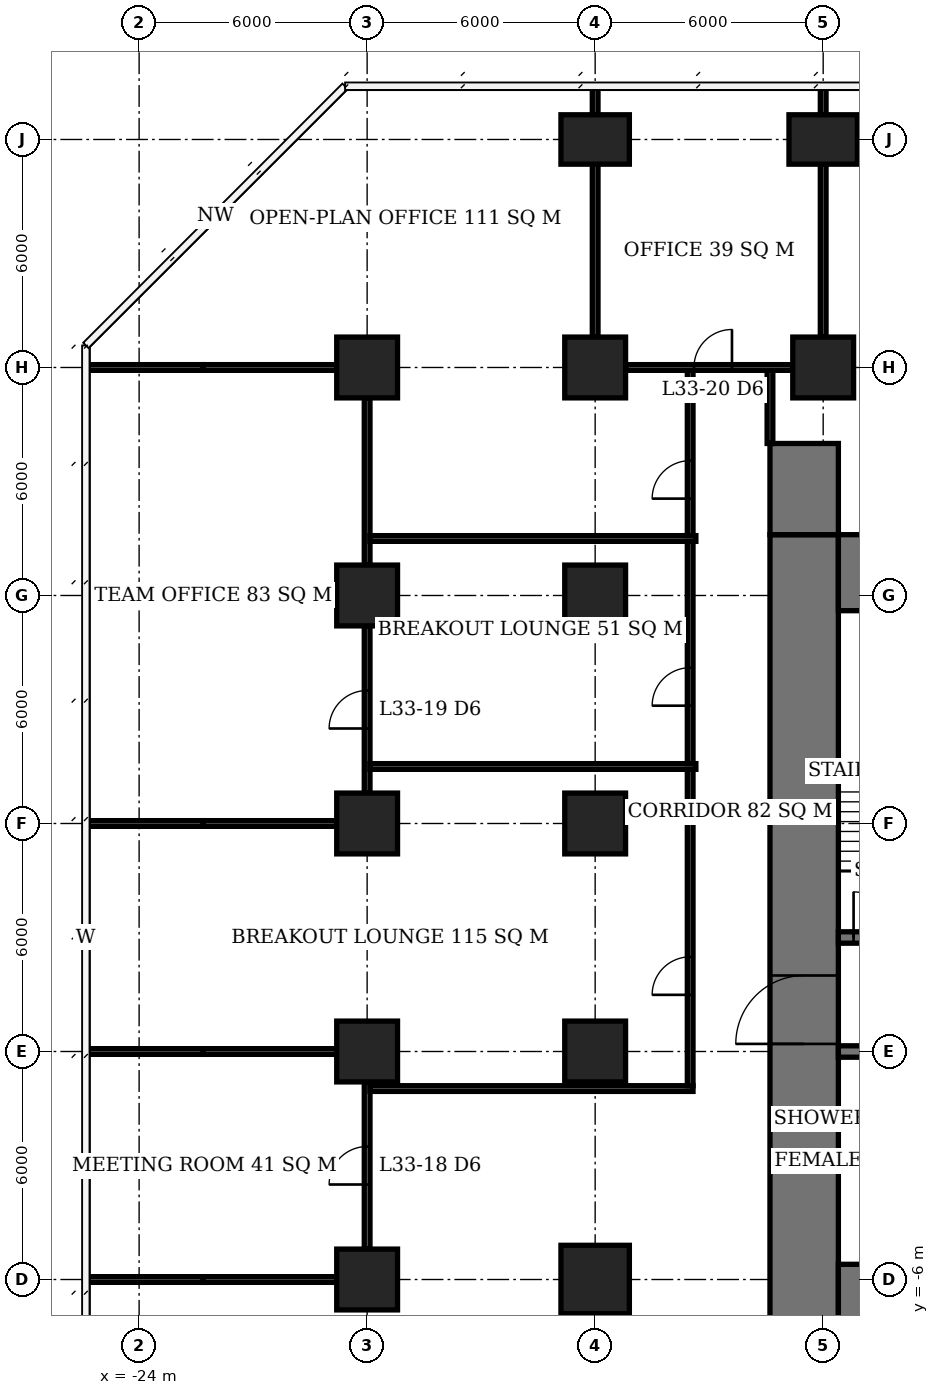
"""IFC4 building model, lengths in metres.
Left out: names, types, materials, properties, quantities, classifications, styles, units other than length and angle.
Written with IfcOpenShell. Run it as: python <this file> out.ifc"""

import sys

from ifc_helpers import new_model, si_unit, direction, frame, frame_2d, origin, origin_2d, place, context, subcontext, project, spatial, rectangle, extrude, element, fill, save


model = new_model("IFC4")
c1 = context("Model", 3, precision=1e-05, world=origin(), true_north=direction((0.0, 1.0)))
c2 = subcontext(c1, "Body", "Model", "MODEL_VIEW")
j1 = project(units=[si_unit("LENGTHUNIT", "METRE"), si_unit("PLANEANGLEUNIT", "RADIAN")], contexts=[c1])
p1 = place(None, origin())
s1 = spatial("IfcSite", under=j1, at=p1, CompositionType="ELEMENT")
p2 = place(p1, origin())
s2 = spatial("IfcBuilding", under=s1, at=p2, CompositionType="ELEMENT")
p3 = place(p2, frame((0.0, 0.0, 136.7)))
s3 = spatial("IfcBuildingStorey", under=s2, at=p3, CompositionType="ELEMENT", Elevation=136.7)
for number, where, z_axis, x_axis in (
    (1, (-18.0, -6.0, 0.0), (0.0, 0.0, 1.0), (1.0, 0.0, 0.0)),
    (2, (-18.0, 0.0, 0.0), (0.0, 0.0, 1.0), (1.0, 0.0, 0.0)),
    (3, (-18.0, 6.0, 0.0), (0.0, 0.0, 1.0), (1.0, 0.0, 0.0)),
    (4, (-18.0, 12.0, 0.0), (0.0, 0.0, 1.0), (1.0, 0.0, 0.0)),
    (5, (-18.0, 18.0, 0.0), (0.0, 0.0, 1.0), (1.0, 0.0, 0.0)),
):
    element("IfcColumn", number, at=place(p3, frame(where, z_axis=z_axis, x_axis=x_axis)), inside=s3, PredefinedType="COLUMN", context=c2, shape_type="SweptSolid", body=[
        extrude(rectangle(XDim=1.6, YDim=1.6, at=origin_2d()), origin(), (0.0, 0.0, 1.0), 3.9),
    ])
p4 = place(p3, frame((-12.0, -6.0, 0.0), z_axis=(0.0, 0.0, 1.0), x_axis=(1.0, 0.0, 0.0)))
e6 = element("IfcColumn", 6, at=p4, inside=s3, PredefinedType="COLUMN", context=c2, shape_type="SweptSolid", body=[
    extrude(rectangle(XDim=1.8, YDim=1.8, at=origin_2d()), origin(), (0.0, 0.0, 1.0), 3.9),
])
for number, where, z_axis, x_axis in (
    (7, (-12.0, 0.0, 0.0), (0.0, 0.0, 1.0), (1.0, 0.0, 0.0)),
    (8, (-12.0, 6.0, 0.0), (0.0, 0.0, 1.0), (1.0, 0.0, 0.0)),
    (9, (-12.0, 12.0, 0.0), (0.0, 0.0, 1.0), (1.0, 0.0, 0.0)),
    (10, (-12.0, 18.0, 0.0), (0.0, 0.0, 1.0), (1.0, 0.0, 0.0)),
):
    element("IfcColumn", number, at=place(p3, frame(where, z_axis=z_axis, x_axis=x_axis)), inside=s3, PredefinedType="COLUMN", context=c2, shape_type="SweptSolid", body=[
        extrude(rectangle(XDim=1.6, YDim=1.6, at=origin_2d()), origin(), (0.0, 0.0, 1.0), 3.9),
    ])
p5 = place(p3, frame((-12.0, 24.0, 0.0), z_axis=(0.0, 0.0, 1.0), x_axis=(1.0, 0.0, 0.0)))
e11 = element("IfcColumn", 11, at=p5, inside=s3, PredefinedType="COLUMN", context=c2, shape_type="SweptSolid", body=[
    extrude(rectangle(XDim=1.8, YDim=1.3, at=origin_2d()), origin(), (0.0, 0.0, 1.0), 3.9),
])
p6 = place(p3, frame((-6.0, 18.0, 0.0), z_axis=(0.0, 0.0, 1.0), x_axis=(1.0, 0.0, 0.0)))
e12 = element("IfcColumn", 12, at=p6, inside=s3, PredefinedType="COLUMN", context=c2, shape_type="SweptSolid", body=[
    extrude(rectangle(XDim=1.6, YDim=1.6, at=origin_2d()), origin(), (0.0, 0.0, 1.0), 3.9),
])
p7 = place(p3, frame((-6.0, 24.0, 0.0), z_axis=(0.0, 0.0, 1.0), x_axis=(1.0, 0.0, 0.0)))
e13 = element("IfcColumn", 13, at=p7, inside=s3, PredefinedType="COLUMN", context=c2, shape_type="SweptSolid", body=[
    extrude(rectangle(XDim=1.8, YDim=1.3, at=origin_2d()), origin(), (0.0, 0.0, 1.0), 3.9),
])
for number, where, z_axis, x_axis in (
    (14, (-5.6, -6.6, 0.0), (0.0, 0.0, 1.0), (1.0, 0.0, 0.0)),
    (15, (-5.6, 12.6, 0.0), (0.0, 0.0, 1.0), (1.0, 0.0, 0.0)),
):
    element("IfcWall", number, at=place(p3, frame(where, z_axis=z_axis, x_axis=x_axis)), inside=s3, PredefinedType="SHEAR", context=c2, shape_type="SweptSolid", body=[
        extrude(rectangle(XDim=23.2, YDim=2.0, at=frame_2d((11.6, 0.0))), origin(), (0.0, 0.0, 1.0), 3.9),
    ])
p8 = place(p3, frame((-6.5, -7.6, 0.0), z_axis=(0.0, 0.0, 1.0), x_axis=(0.0, 1.0, 0.0)))
e16 = element("IfcWall", 16, at=p8, inside=s3, PredefinedType="SHEAR", context=c2, shape_type="SweptSolid", body=[
    extrude(rectangle(XDim=21.2, YDim=1.8, at=frame_2d((10.6, 0.0))), origin(), (0.0, 0.0, 1.0), 3.9),
])
p9 = place(p8, frame((7.8, 0.0, 0.0)))
e17 = element("IfcOpeningElement", 17, at=p9, cuts=e16, PredefinedType="OPENING", context=c2, shape_type="SweptSolid", body=[
    extrude(rectangle(XDim=1.8, YDim=2.4, at=frame_2d((0.9, 1.2))), frame((0.0, 0.91, 0.0), z_axis=(0.0, -1.0, 0.0), x_axis=(1.0, 0.0, 0.0)), (0.0, 0.0, 1.0), 1.82),
])
p10 = place(p3, frame((-6.5, 13.6, 0.0), z_axis=(0.0, 0.0, 1.0), x_axis=(0.0, 1.0, 0.0)))
e18 = element("IfcWall", 18, at=p10, inside=s3, PredefinedType="SHEAR", context=c2, shape_type="SweptSolid", body=[
    extrude(rectangle(XDim=2.4, YDim=1.8, at=frame_2d((1.2, 0.0))), origin(), (0.0, 0.0, 1.0), 3.9),
])
p11 = place(p3, frame((-5.6, 0.0, 0.0), z_axis=(0.0, 0.0, 1.0), x_axis=(1.0, 0.0, 0.0)))
e19 = element("IfcWall", 19, at=p11, inside=s3, PredefinedType="SHEAR", context=c2, shape_type="SweptSolid", body=[
    extrude(rectangle(XDim=17.75, YDim=0.3, at=frame_2d((8.875, 0.0))), origin(), (0.0, 0.0, 1.0), 3.9),
])
p12 = place(p11, frame((0.6, 0.0, 0.0)))
e20 = element("IfcOpeningElement", 20, at=p12, cuts=e19, PredefinedType="OPENING", context=c2, shape_type="SweptSolid", body=[
    extrude(rectangle(XDim=0.9, YDim=2.1, at=frame_2d((0.45, 1.05))), frame((0.0, 0.16, 0.0), z_axis=(0.0, -1.0, 0.0), x_axis=(1.0, 0.0, 0.0)), (0.0, 0.0, 1.0), 0.32),
])
p13 = place(p11, frame((3.7, 0.0, 0.0)))
e21 = element("IfcOpeningElement", 21, at=p13, cuts=e19, PredefinedType="OPENING", context=c2, shape_type="SweptSolid", body=[
    extrude(rectangle(XDim=0.9, YDim=2.1, at=frame_2d((0.45, 1.05))), frame((0.0, 0.16, 0.0), z_axis=(0.0, -1.0, 0.0), x_axis=(1.0, 0.0, 0.0)), (0.0, 0.0, 1.0), 0.32),
])
p14 = place(p11, frame((6.55, 0.0, 0.0)))
e22 = element("IfcOpeningElement", 22, at=p14, cuts=e19, PredefinedType="OPENING", context=c2, shape_type="SweptSolid", body=[
    extrude(rectangle(XDim=1.1, YDim=2.1, at=frame_2d((0.55, 1.05))), frame((0.0, 0.16, 0.0), z_axis=(0.0, -1.0, 0.0), x_axis=(1.0, 0.0, 0.0)), (0.0, 0.0, 1.0), 0.32),
])
p15 = place(p11, frame((9.55, 0.0, 0.0)))
e23 = element("IfcOpeningElement", 23, at=p15, cuts=e19, PredefinedType="OPENING", context=c2, shape_type="SweptSolid", body=[
    extrude(rectangle(XDim=1.1, YDim=2.1, at=frame_2d((0.55, 1.05))), frame((0.0, 0.16, 0.0), z_axis=(0.0, -1.0, 0.0), x_axis=(1.0, 0.0, 0.0)), (0.0, 0.0, 1.0), 0.32),
])
p16 = place(p3, frame((-5.6, 3.0, 0.0), z_axis=(0.0, 0.0, 1.0), x_axis=(1.0, 0.0, 0.0)))
e24 = element("IfcWall", 24, at=p16, inside=s3, PredefinedType="SHEAR", context=c2, shape_type="SweptSolid", body=[
    extrude(rectangle(XDim=5.45, YDim=0.3, at=frame_2d((2.725, 0.0))), origin(), (0.0, 0.0, 1.0), 3.9),
])
p17 = place(p16, frame((0.4, 0.0, 0.0)))
e25 = element("IfcOpeningElement", 25, at=p17, cuts=e24, PredefinedType="OPENING", context=c2, shape_type="SweptSolid", body=[
    extrude(rectangle(XDim=1.2, YDim=2.1, at=frame_2d((0.6, 1.05))), frame((0.0, 0.16, 0.0), z_axis=(0.0, -1.0, 0.0), x_axis=(1.0, 0.0, 0.0)), (0.0, 0.0, 1.0), 0.32),
])
p18 = place(p16, frame((3.95, 0.0, 0.0)))
e26 = element("IfcOpeningElement", 26, at=p18, cuts=e24, PredefinedType="OPENING", context=c2, shape_type="SweptSolid", body=[
    extrude(rectangle(XDim=0.9, YDim=2.1, at=frame_2d((0.45, 1.05))), frame((0.0, 0.16, 0.0), z_axis=(0.0, -1.0, 0.0), x_axis=(1.0, 0.0, 0.0)), (0.0, 0.0, 1.0), 0.32),
])
p19 = place(p3, frame((-25.4, -6.0, 0.0), z_axis=(0.0, 0.0, 1.0), x_axis=(1.0, 0.0, 0.0)))
e27 = element("IfcWall", 27, at=p19, inside=s3, PredefinedType="PARTITIONING", context=c2, shape_type="SweptSolid", body=[
    extrude(rectangle(XDim=3.09, YDim=0.15, at=frame_2d((1.545, 0.0))), origin(), (0.0, 0.0, 1.0), 3.65),
])
p20 = place(p3, frame((-22.31, -6.0, 0.0), z_axis=(0.0, 0.0, 1.0), x_axis=(1.0, 0.0, 0.0)))
e28 = element("IfcWall", 28, at=p20, inside=s3, PredefinedType="PARTITIONING", context=c2, shape_type="SweptSolid", body=[
    extrude(rectangle(XDim=3.51, YDim=0.15, at=frame_2d((1.755, 0.0))), origin(), (0.0, 0.0, 1.0), 2.65),
])
p21 = place(p3, frame((-25.35, 0.0, 0.0), z_axis=(0.0, 0.0, 1.0), x_axis=(1.0, 0.0, 0.0)))
e29 = element("IfcWall", 29, at=p21, inside=s3, PredefinedType="PARTITIONING", context=c2, shape_type="SweptSolid", body=[
    extrude(rectangle(XDim=3.04, YDim=0.15, at=frame_2d((1.52, 0.0))), origin(), (0.0, 0.0, 1.0), 3.65),
])
p22 = place(p3, frame((-22.31, 0.0, 0.0), z_axis=(0.0, 0.0, 1.0), x_axis=(1.0, 0.0, 0.0)))
e30 = element("IfcWall", 30, at=p22, inside=s3, PredefinedType="PARTITIONING", context=c2, shape_type="SweptSolid", body=[
    extrude(rectangle(XDim=3.51, YDim=0.15, at=frame_2d((1.755, 0.0))), origin(), (0.0, 0.0, 1.0), 2.65),
])
p23 = place(p3, frame((-25.35, 6.0, 0.0), z_axis=(0.0, 0.0, 1.0), x_axis=(1.0, 0.0, 0.0)))
e31 = element("IfcWall", 31, at=p23, inside=s3, PredefinedType="PARTITIONING", context=c2, shape_type="SweptSolid", body=[
    extrude(rectangle(XDim=3.04, YDim=0.15, at=frame_2d((1.52, 0.0))), origin(), (0.0, 0.0, 1.0), 3.65),
])
p24 = place(p3, frame((-22.31, 6.0, 0.0), z_axis=(0.0, 0.0, 1.0), x_axis=(1.0, 0.0, 0.0)))
e32 = element("IfcWall", 32, at=p24, inside=s3, PredefinedType="PARTITIONING", context=c2, shape_type="SweptSolid", body=[
    extrude(rectangle(XDim=3.51, YDim=0.15, at=frame_2d((1.755, 0.0))), origin(), (0.0, 0.0, 1.0), 2.65),
])
p25 = place(p3, frame((-25.4, 18.0, 0.0), z_axis=(0.0, 0.0, 1.0), x_axis=(1.0, 0.0, 0.0)))
e33 = element("IfcWall", 33, at=p25, inside=s3, PredefinedType="PARTITIONING", context=c2, shape_type="SweptSolid", body=[
    extrude(rectangle(XDim=3.09, YDim=0.15, at=frame_2d((1.545, 0.0))), origin(), (0.0, 0.0, 1.0), 3.65),
])
p26 = place(p3, frame((-22.31, 18.0, 0.0), z_axis=(0.0, 0.0, 1.0), x_axis=(1.0, 0.0, 0.0)))
e34 = element("IfcWall", 34, at=p26, inside=s3, PredefinedType="PARTITIONING", context=c2, shape_type="SweptSolid", body=[
    extrude(rectangle(XDim=3.51, YDim=0.15, at=frame_2d((1.755, 0.0))), origin(), (0.0, 0.0, 1.0), 2.65),
])
p27 = place(p3, frame((-11.2, 18.0, 0.0), z_axis=(0.0, 0.0, 1.0), x_axis=(1.0, 0.0, 0.0)))
e35 = element("IfcWall", 35, at=p27, inside=s3, PredefinedType="PARTITIONING", context=c2, shape_type="SweptSolid", body=[
    extrude(rectangle(XDim=4.4, YDim=0.15, at=frame_2d((2.2, 0.0))), origin(), (0.0, 0.0, 1.0), 3.65),
])
p28 = place(p27, frame((1.8, 0.0, 0.0)))
e36 = element("IfcOpeningElement", 36, at=p28, cuts=e35, PredefinedType="OPENING", context=c2, shape_type="SweptSolid", body=[
    extrude(rectangle(XDim=1.0, YDim=2.1, at=frame_2d((0.5, 1.05))), frame((0.0, 0.085, 0.0), z_axis=(0.0, -1.0, 0.0), x_axis=(1.0, 0.0, 0.0)), (0.0, 0.0, 1.0), 0.17),
])
p29 = place(p3, frame((-18.0, -5.2, 0.0), z_axis=(0.0, 0.0, 1.0), x_axis=(0.0, 1.0, 0.0)))
e37 = element("IfcWall", 37, at=p29, inside=s3, PredefinedType="PARTITIONING", context=c2, shape_type="SweptSolid", body=[
    extrude(rectangle(XDim=4.4, YDim=0.15, at=frame_2d((2.2, 0.0))), origin(), (0.0, 0.0, 1.0), 3.65),
])
p30 = place(p29, frame((1.7, 0.0, 0.0)))
e38 = element("IfcOpeningElement", 38, at=p30, cuts=e37, PredefinedType="OPENING", context=c2, shape_type="SweptSolid", body=[
    extrude(rectangle(XDim=1.0, YDim=2.1, at=frame_2d((0.5, 1.05))), frame((0.0, 0.085, 0.0), z_axis=(0.0, -1.0, 0.0), x_axis=(1.0, 0.0, 0.0)), (0.0, 0.0, 1.0), 0.17),
])
p31 = place(p3, frame((-18.0, 6.8, 0.0), z_axis=(0.0, 0.0, 1.0), x_axis=(0.0, 1.0, 0.0)))
e39 = element("IfcWall", 39, at=p31, inside=s3, PredefinedType="PARTITIONING", context=c2, shape_type="SweptSolid", body=[
    extrude(rectangle(XDim=4.4, YDim=0.15, at=frame_2d((2.2, 0.0))), origin(), (0.0, 0.0, 1.0), 3.65),
])
p32 = place(p31, frame((1.7, 0.0, 0.0)))
e40 = element("IfcOpeningElement", 40, at=p32, cuts=e39, PredefinedType="OPENING", context=c2, shape_type="SweptSolid", body=[
    extrude(rectangle(XDim=1.0, YDim=2.1, at=frame_2d((0.5, 1.05))), frame((0.0, 0.085, 0.0), z_axis=(0.0, -1.0, 0.0), x_axis=(1.0, 0.0, 0.0)), (0.0, 0.0, 1.0), 0.17),
])
p33 = place(p3, frame((-18.0, 12.8, 0.0), z_axis=(0.0, 0.0, 1.0), x_axis=(0.0, 1.0, 0.0)))
e41 = element("IfcWall", 41, at=p33, inside=s3, PredefinedType="PARTITIONING", context=c2, shape_type="SweptSolid", body=[
    extrude(rectangle(XDim=4.4, YDim=0.15, at=frame_2d((2.2, 0.0))), origin(), (0.0, 0.0, 1.0), 3.65),
])
p34 = place(p3, frame((-12.0, 18.8, 0.0), z_axis=(0.0, 0.0, 1.0), x_axis=(0.0, 1.0, 0.0)))
e42 = element("IfcWall", 42, at=p34, inside=s3, PredefinedType="PARTITIONING", context=c2, shape_type="SweptSolid", body=[
    extrude(rectangle(XDim=4.55, YDim=0.15, at=frame_2d((2.275, 0.0))), origin(), (0.0, 0.0, 1.0), 3.65),
])
p35 = place(p3, frame((-12.0, 24.65, 0.0), z_axis=(0.0, 0.0, 1.0), x_axis=(0.0, 1.0, 0.0)))
e43 = element("IfcWall", 43, at=p35, inside=s3, PredefinedType="PARTITIONING", context=c2, shape_type="SweptSolid", body=[
    extrude(rectangle(XDim=0.75, YDim=0.15, at=frame_2d((0.375, 0.0))), origin(), (0.0, 0.0, 1.0), 3.65),
])
p36 = place(p3, frame((-6.0, 18.8, 0.0), z_axis=(0.0, 0.0, 1.0), x_axis=(0.0, 1.0, 0.0)))
e44 = element("IfcWall", 44, at=p36, inside=s3, PredefinedType="PARTITIONING", context=c2, shape_type="SweptSolid", body=[
    extrude(rectangle(XDim=4.55, YDim=0.15, at=frame_2d((2.275, 0.0))), origin(), (0.0, 0.0, 1.0), 3.65),
])
p37 = place(p3, frame((-6.0, 24.65, 0.0), z_axis=(0.0, 0.0, 1.0), x_axis=(0.0, 1.0, 0.0)))
e45 = element("IfcWall", 45, at=p37, inside=s3, PredefinedType="PARTITIONING", context=c2, shape_type="SweptSolid", body=[
    extrude(rectangle(XDim=0.75, YDim=0.15, at=frame_2d((0.375, 0.0))), origin(), (0.0, 0.0, 1.0), 3.65),
])
p38 = place(p3, frame((-17.925, -0.975, 0.0), z_axis=(0.0, 0.0, 1.0), x_axis=(1.0, 0.0, 0.0)))
e46 = element("IfcWall", 46, at=p38, inside=s3, PredefinedType="PARTITIONING", context=c2, shape_type="SweptSolid", body=[
    extrude(rectangle(XDim=8.5, YDim=0.15, at=frame_2d((4.25, 0.0))), origin(), (0.0, 0.0, 1.0), 3.65),
])
for number, where, z_axis, x_axis in (
    (47, (-17.925, 7.5, 0.0), (0.0, 0.0, 1.0), (1.0, 0.0, 0.0)),
    (48, (-17.925, 13.5, 0.0), (0.0, 0.0, 1.0), (1.0, 0.0, 0.0)),
):
    element("IfcWall", number, at=place(p3, frame(where, z_axis=z_axis, x_axis=x_axis)), inside=s3, PredefinedType="PARTITIONING", context=c2, shape_type="SweptSolid", body=[
        extrude(rectangle(XDim=8.575, YDim=0.15, at=frame_2d((4.288, 0.0))), origin(), (0.0, 0.0, 1.0), 3.65),
    ])
p39 = place(p3, frame((-9.5, -0.9, 0.0), z_axis=(0.0, 0.0, 1.0), x_axis=(0.0, 1.0, 0.0)))
e49 = element("IfcWall", 49, at=p39, inside=s3, PredefinedType="PARTITIONING", context=c2, shape_type="SweptSolid", body=[
    extrude(rectangle(XDim=8.325, YDim=0.15, at=frame_2d((4.163, 0.0))), origin(), (0.0, 0.0, 1.0), 3.65),
])
p40 = place(p39, frame((2.391, 0.0, 0.0)))
e50 = element("IfcOpeningElement", 50, at=p40, cuts=e49, PredefinedType="OPENING", context=c2, shape_type="SweptSolid", body=[
    extrude(rectangle(XDim=1.0, YDim=2.1, at=frame_2d((0.5, 1.05))), frame((0.0, 0.085, 0.0), z_axis=(0.0, -1.0, 0.0), x_axis=(1.0, 0.0, 0.0)), (0.0, 0.0, 1.0), 0.17),
])
p41 = place(p3, frame((-9.5, 7.575, 0.0), z_axis=(0.0, 0.0, 1.0), x_axis=(0.0, 1.0, 0.0)))
e51 = element("IfcWall", 51, at=p41, inside=s3, PredefinedType="PARTITIONING", context=c2, shape_type="SweptSolid", body=[
    extrude(rectangle(XDim=5.85, YDim=0.15, at=frame_2d((2.925, 0.0))), origin(), (0.0, 0.0, 1.0), 3.65),
])
p42 = place(p41, frame((1.525, 0.0, 0.0)))
e52 = element("IfcOpeningElement", 52, at=p42, cuts=e51, PredefinedType="OPENING", context=c2, shape_type="SweptSolid", body=[
    extrude(rectangle(XDim=1.0, YDim=2.1, at=frame_2d((0.5, 1.05))), frame((0.0, 0.085, 0.0), z_axis=(0.0, -1.0, 0.0), x_axis=(1.0, 0.0, 0.0)), (0.0, 0.0, 1.0), 0.17),
])
p43 = place(p3, frame((-9.5, 13.575, 0.0), z_axis=(0.0, 0.0, 1.0), x_axis=(0.0, 1.0, 0.0)))
e53 = element("IfcWall", 53, at=p43, inside=s3, PredefinedType="PARTITIONING", context=c2, shape_type="SweptSolid", body=[
    extrude(rectangle(XDim=4.35, YDim=0.15, at=frame_2d((2.175, 0.0))), origin(), (0.0, 0.0, 1.0), 3.65),
])
p44 = place(p43, frame((0.974, 0.0, 0.0)))
e54 = element("IfcOpeningElement", 54, at=p44, cuts=e53, PredefinedType="OPENING", context=c2, shape_type="SweptSolid", body=[
    extrude(rectangle(XDim=1.0, YDim=2.1, at=frame_2d((0.5, 1.05))), frame((0.0, 0.085, 0.0), z_axis=(0.0, -1.0, 0.0), x_axis=(1.0, 0.0, 0.0)), (0.0, 0.0, 1.0), 0.17),
])
p45 = place(p3, frame((-7.4, 16.0, 0.0), z_axis=(0.0, 0.0, 1.0), x_axis=(0.0, 1.0, 0.0)))
e55 = element("IfcWall", 55, at=p45, inside=s3, PredefinedType="PARTITIONING", context=c2, shape_type="SweptSolid", body=[
    extrude(rectangle(XDim=1.925, YDim=0.15, at=frame_2d((0.962, 0.0))), origin(), (0.0, 0.0, 1.0), 3.65),
])
p46 = place(p9, origin())
e56 = element("IfcDoor", 56, at=p46, inside=s3, OperationType="DOUBLE_DOOR_SINGLE_SWING", PredefinedType="DOOR", context=c2, shape_type="SweptSolid", body=[
    extrude(rectangle(XDim=1.8, YDim=2.4, at=frame_2d((0.9, 1.2))), frame((0.0, 0.025, 0.0), z_axis=(0.0, -1.0, 0.0), x_axis=(1.0, 0.0, 0.0)), (0.0, 0.0, 1.0), 0.05),
])
fill(e17, e56)
p47 = place(p17, origin())
e57 = element("IfcDoor", 57, at=p47, inside=s3, OperationType="SINGLE_SWING_LEFT", PredefinedType="DOOR", context=c2, shape_type="SweptSolid", body=[
    extrude(rectangle(XDim=1.2, YDim=2.1, at=frame_2d((0.6, 1.05))), frame((0.0, 0.025, 0.0), z_axis=(0.0, -1.0, 0.0), x_axis=(1.0, 0.0, 0.0)), (0.0, 0.0, 1.0), 0.05),
])
fill(e25, e57)
p48 = place(p30, origin())
e58 = element("IfcDoor", 58, at=p48, inside=s3, OperationType="SINGLE_SWING_LEFT", PredefinedType="DOOR", context=c2, shape_type="SweptSolid", body=[
    extrude(rectangle(XDim=1.0, YDim=2.1, at=frame_2d((0.5, 1.05))), frame((0.0, 0.025, 0.0), z_axis=(0.0, -1.0, 0.0), x_axis=(1.0, 0.0, 0.0)), (0.0, 0.0, 1.0), 0.05),
])
fill(e38, e58)
p49 = place(p32, origin())
e59 = element("IfcDoor", 59, at=p49, inside=s3, OperationType="SINGLE_SWING_LEFT", PredefinedType="DOOR", context=c2, shape_type="SweptSolid", body=[
    extrude(rectangle(XDim=1.0, YDim=2.1, at=frame_2d((0.5, 1.05))), frame((0.0, 0.025, 0.0), z_axis=(0.0, -1.0, 0.0), x_axis=(1.0, 0.0, 0.0)), (0.0, 0.0, 1.0), 0.05),
])
fill(e40, e59)
p50 = place(p28, origin())
e60 = element("IfcDoor", 60, at=p50, inside=s3, OperationType="SINGLE_SWING_RIGHT", PredefinedType="DOOR", context=c2, shape_type="SweptSolid", body=[
    extrude(rectangle(XDim=1.0, YDim=2.1, at=frame_2d((0.5, 1.05))), frame((0.0, 0.025, 0.0), z_axis=(0.0, -1.0, 0.0), x_axis=(1.0, 0.0, 0.0)), (0.0, 0.0, 1.0), 0.05),
])
fill(e36, e60)
p51 = place(p40, origin())
e61 = element("IfcDoor", 61, at=p51, inside=s3, OperationType="SINGLE_SWING_LEFT", PredefinedType="DOOR", context=c2, shape_type="SweptSolid", body=[
    extrude(rectangle(XDim=1.0, YDim=2.1, at=frame_2d((0.5, 1.05))), frame((0.0, 0.025, 0.0), z_axis=(0.0, -1.0, 0.0), x_axis=(1.0, 0.0, 0.0)), (0.0, 0.0, 1.0), 0.05),
])
fill(e50, e61)
p52 = place(p42, origin())
e62 = element("IfcDoor", 62, at=p52, inside=s3, OperationType="SINGLE_SWING_LEFT", PredefinedType="DOOR", context=c2, shape_type="SweptSolid", body=[
    extrude(rectangle(XDim=1.0, YDim=2.1, at=frame_2d((0.5, 1.05))), frame((0.0, 0.025, 0.0), z_axis=(0.0, -1.0, 0.0), x_axis=(1.0, 0.0, 0.0)), (0.0, 0.0, 1.0), 0.05),
])
fill(e52, e62)
p53 = place(p44, origin())
e63 = element("IfcDoor", 63, at=p53, inside=s3, OperationType="SINGLE_SWING_LEFT", PredefinedType="DOOR", context=c2, shape_type="SweptSolid", body=[
    extrude(rectangle(XDim=1.0, YDim=2.1, at=frame_2d((0.5, 1.05))), frame((0.0, 0.025, 0.0), z_axis=(0.0, -1.0, 0.0), x_axis=(1.0, 0.0, 0.0)), (0.0, 0.0, 1.0), 0.05),
])
fill(e54, e63)
save(model, sys.argv[1])
